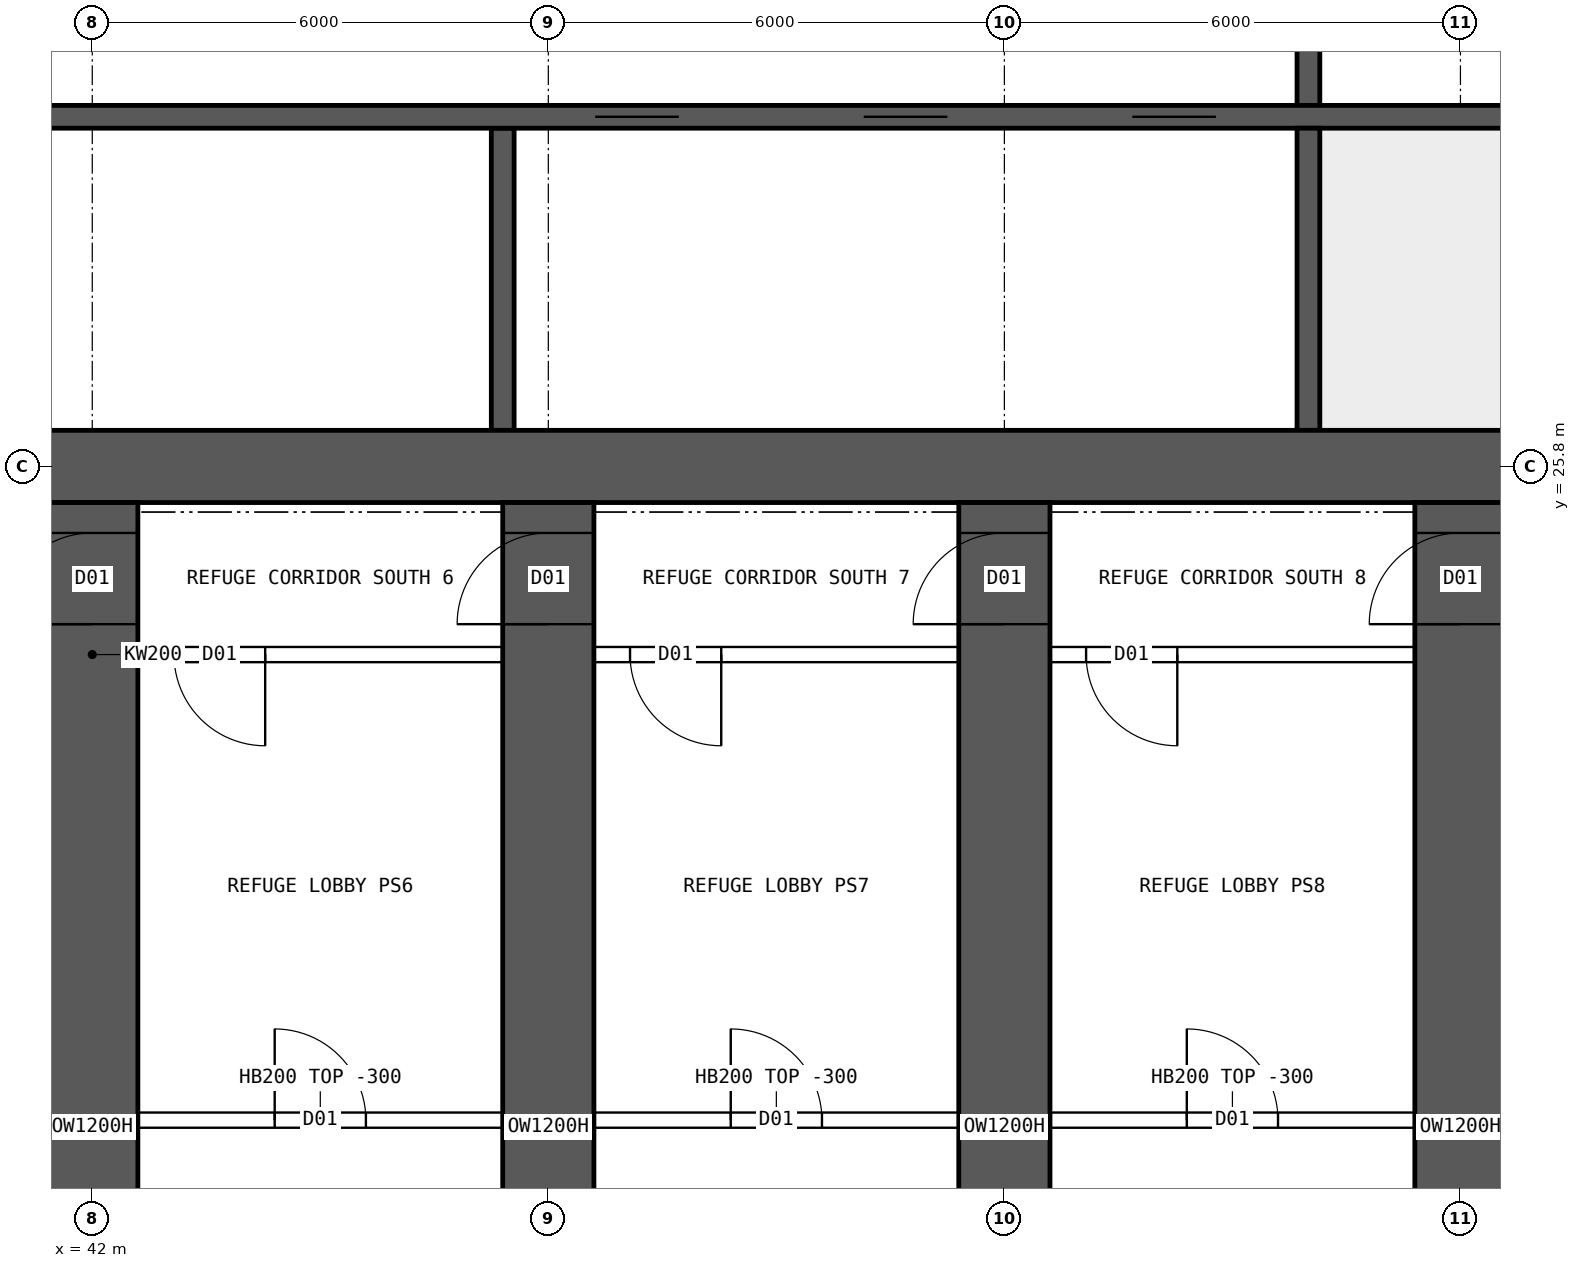
"""IFC4 building model, lengths in metres.
Left out: names, types, materials, properties, quantities, classifications, styles, units other than length and angle.
Written with IfcOpenShell. Run it as: python <this file> out.ifc"""

import sys

from ifc_helpers import new_model, si_unit, direction, frame, frame_2d, origin, place, context, subcontext, project, spatial, rectangle, extrude, element, fill, save


model = new_model("IFC4")
c1 = context("Model", 3, precision=1e-05, world=origin(), true_north=direction((0.0, 1.0)))
c2 = subcontext(c1, "Body", "Model", "MODEL_VIEW")
j1 = project(units=[si_unit("LENGTHUNIT", "METRE"), si_unit("PLANEANGLEUNIT", "RADIAN")], contexts=[c1])
p1 = place(None, origin())
s1 = spatial("IfcSite", under=j1, at=p1, CompositionType="ELEMENT")
p2 = place(p1, origin())
s2 = spatial("IfcBuilding", under=s1, at=p2, CompositionType="ELEMENT")
p3 = place(p2, frame((0.0, 0.0, 133.15)))
s3 = spatial("IfcBuildingStorey", under=s2, at=p3, CompositionType="ELEMENT", Elevation=133.15)
p4 = place(p3, frame((18.0, 25.8, 0.0), z_axis=(0.0, 0.0, 1.0), x_axis=(1.0, 0.0, 0.0)))
e1 = element("IfcWall", 1, at=p4, inside=s3, PredefinedType="SHEAR", context=c2, shape_type="SweptSolid", body=[
    extrude(rectangle(XDim=48.0, YDim=0.95, at=frame_2d((24.0, 0.0))), origin(), (0.0, 0.0, 1.0), 7.2),
])
p5 = place(p3, frame((18.475, 30.4, 0.0), z_axis=(0.0, 0.0, 1.0), x_axis=(1.0, 0.0, 0.0)))
e2 = element("IfcWall", 2, at=p5, inside=s3, PredefinedType="SHEAR", context=c2, shape_type="SweptSolid", body=[
    extrude(rectangle(XDim=47.05, YDim=0.3, at=frame_2d((23.525, 0.0))), origin(), (0.0, 0.0, 1.0), 7.2),
])
p6 = place(p5, frame((0.4, 0.0, 0.0)))
e3 = element("IfcOpeningElement", 3, at=p6, cuts=e2, PredefinedType="OPENING", context=c2, shape_type="SweptSolid", body=[
    extrude(rectangle(XDim=1.0, YDim=2.1, at=frame_2d((0.5, 1.05))), frame((0.0, 0.16, 0.0), z_axis=(0.0, -1.0, 0.0), x_axis=(1.0, 0.0, 0.0)), (0.0, 0.0, 1.0), 0.32),
])
p7 = place(p5, frame((45.65, 0.0, 0.0)))
e4 = element("IfcOpeningElement", 4, at=p7, cuts=e2, PredefinedType="OPENING", context=c2, shape_type="SweptSolid", body=[
    extrude(rectangle(XDim=1.0, YDim=2.1, at=frame_2d((0.5, 1.05))), frame((0.0, 0.16, 0.0), z_axis=(0.0, -1.0, 0.0), x_axis=(1.0, 0.0, 0.0)), (0.0, 0.0, 1.0), 0.32),
])
p8 = place(p5, frame((18.85, 0.0, 0.0)))
e5 = element("IfcOpeningElement", 5, at=p8, cuts=e2, PredefinedType="OPENING", context=c2, shape_type="SweptSolid", body=[
    extrude(rectangle(XDim=0.9, YDim=2.1, at=frame_2d((0.45, 1.05))), frame((0.0, 0.16, 0.0), z_axis=(0.0, -1.0, 0.0), x_axis=(1.0, 0.0, 0.0)), (0.0, 0.0, 1.0), 0.32),
])
p9 = place(p5, frame((30.142, 0.0, 0.0)))
e6 = element("IfcOpeningElement", 6, at=p9, cuts=e2, PredefinedType="OPENING", context=c2, shape_type="SweptSolid", body=[
    extrude(rectangle(XDim=1.1, YDim=2.1, at=frame_2d((0.55, 1.05))), frame((0.0, 0.16, 0.0), z_axis=(0.0, -1.0, 0.0), x_axis=(1.0, 0.0, 0.0)), (0.0, 0.0, 1.0), 0.32),
])
p10 = place(p5, frame((33.675, 0.0, 0.0)))
e7 = element("IfcOpeningElement", 7, at=p10, cuts=e2, PredefinedType="OPENING", context=c2, shape_type="SweptSolid", body=[
    extrude(rectangle(XDim=1.1, YDim=2.1, at=frame_2d((0.55, 1.05))), frame((0.0, 0.16, 0.0), z_axis=(0.0, -1.0, 0.0), x_axis=(1.0, 0.0, 0.0)), (0.0, 0.0, 1.0), 0.32),
])
p11 = place(p5, frame((37.208, 0.0, 0.0)))
e8 = element("IfcOpeningElement", 8, at=p11, cuts=e2, PredefinedType="OPENING", context=c2, shape_type="SweptSolid", body=[
    extrude(rectangle(XDim=1.1, YDim=2.1, at=frame_2d((0.55, 1.05))), frame((0.0, 0.16, 0.0), z_axis=(0.0, -1.0, 0.0), x_axis=(1.0, 0.0, 0.0)), (0.0, 0.0, 1.0), 0.32),
])
p12 = place(p3, frame((58.0, 26.275, 0.0), z_axis=(0.0, 0.0, 1.0), x_axis=(0.0, 1.0, 0.0)))
e9 = element("IfcWall", 9, at=p12, inside=s3, PredefinedType="SHEAR", context=c2, shape_type="SweptSolid", body=[
    extrude(rectangle(XDim=3.975, YDim=0.3, at=frame_2d((1.988, 0.0))), origin(), (0.0, 0.0, 1.0), 7.2),
])
p13 = place(p3, frame((58.0, 30.55, 0.0), z_axis=(0.0, 0.0, 1.0), x_axis=(0.0, 1.0, 0.0)))
e10 = element("IfcWall", 10, at=p13, inside=s3, PredefinedType="SHEAR", context=c2, shape_type="SweptSolid", body=[
    extrude(rectangle(XDim=3.9, YDim=0.3, at=frame_2d((1.95, 0.0))), origin(), (0.0, 0.0, 1.0), 7.2),
])
p14 = place(p13, frame((1.4, 0.0, 0.0)))
e11 = element("IfcOpeningElement", 11, at=p14, cuts=e10, PredefinedType="OPENING", context=c2, shape_type="SweptSolid", body=[
    extrude(rectangle(XDim=1.2, YDim=2.1, at=frame_2d((0.6, 1.05))), frame((0.0, 0.16, 0.0), z_axis=(0.0, -1.0, 0.0), x_axis=(1.0, 0.0, 0.0)), (0.0, 0.0, 1.0), 0.32),
])
p15 = place(p3, frame((47.4, 26.275, 0.0), z_axis=(0.0, 0.0, 1.0), x_axis=(0.0, 1.0, 0.0)))
e12 = element("IfcWall", 12, at=p15, inside=s3, PredefinedType="SHEAR", context=c2, shape_type="SweptSolid", body=[
    extrude(rectangle(XDim=3.975, YDim=0.3, at=frame_2d((1.988, 0.0))), origin(), (0.0, 0.0, 1.0), 7.2),
])
p16 = place(p3, frame((42.0, 8.9, 0.0), z_axis=(0.0, 0.0, 1.0), x_axis=(0.0, 1.0, 0.0)))
e13 = element("IfcWall", 13, at=p16, inside=s3, PredefinedType="SHEAR", context=c2, shape_type="SweptSolid", body=[
    extrude(rectangle(XDim=16.425, YDim=1.2, at=frame_2d((8.212, 0.0))), origin(), (0.0, 0.0, 1.0), 7.2),
])
p17 = place(p16, frame((14.825, 0.0, 0.0)))
e14 = element("IfcOpeningElement", 14, at=p17, cuts=e13, PredefinedType="OPENING", context=c2, shape_type="SweptSolid", body=[
    extrude(rectangle(XDim=1.2, YDim=2.1, at=frame_2d((0.6, 1.05))), frame((0.0, 0.61, 0.0), z_axis=(0.0, -1.0, 0.0), x_axis=(1.0, 0.0, 0.0)), (0.0, 0.0, 1.0), 1.22),
])
p18 = place(p3, frame((48.0, 8.9, 0.0), z_axis=(0.0, 0.0, 1.0), x_axis=(0.0, 1.0, 0.0)))
e15 = element("IfcWall", 15, at=p18, inside=s3, PredefinedType="SHEAR", context=c2, shape_type="SweptSolid", body=[
    extrude(rectangle(XDim=16.425, YDim=1.2, at=frame_2d((8.212, 0.0))), origin(), (0.0, 0.0, 1.0), 7.2),
])
p19 = place(p18, frame((14.825, 0.0, 0.0)))
e16 = element("IfcOpeningElement", 16, at=p19, cuts=e15, PredefinedType="OPENING", context=c2, shape_type="SweptSolid", body=[
    extrude(rectangle(XDim=1.2, YDim=2.1, at=frame_2d((0.6, 1.05))), frame((0.0, 0.61, 0.0), z_axis=(0.0, -1.0, 0.0), x_axis=(1.0, 0.0, 0.0)), (0.0, 0.0, 1.0), 1.22),
])
p20 = place(p3, frame((54.0, 8.9, 0.0), z_axis=(0.0, 0.0, 1.0), x_axis=(0.0, 1.0, 0.0)))
e17 = element("IfcWall", 17, at=p20, inside=s3, PredefinedType="SHEAR", context=c2, shape_type="SweptSolid", body=[
    extrude(rectangle(XDim=16.425, YDim=1.2, at=frame_2d((8.212, 0.0))), origin(), (0.0, 0.0, 1.0), 7.2),
])
p21 = place(p20, frame((14.825, 0.0, 0.0)))
e18 = element("IfcOpeningElement", 18, at=p21, cuts=e17, PredefinedType="OPENING", context=c2, shape_type="SweptSolid", body=[
    extrude(rectangle(XDim=1.2, YDim=2.1, at=frame_2d((0.6, 1.05))), frame((0.0, 0.61, 0.0), z_axis=(0.0, -1.0, 0.0), x_axis=(1.0, 0.0, 0.0)), (0.0, 0.0, 1.0), 1.22),
])
p22 = place(p3, frame((60.0, 8.9, 0.0), z_axis=(0.0, 0.0, 1.0), x_axis=(0.0, 1.0, 0.0)))
e19 = element("IfcWall", 19, at=p22, inside=s3, PredefinedType="SHEAR", context=c2, shape_type="SweptSolid", body=[
    extrude(rectangle(XDim=16.425, YDim=1.2, at=frame_2d((8.212, 0.0))), origin(), (0.0, 0.0, 1.0), 7.2),
])
p23 = place(p22, frame((14.825, 0.0, 0.0)))
e20 = element("IfcOpeningElement", 20, at=p23, cuts=e19, PredefinedType="OPENING", context=c2, shape_type="SweptSolid", body=[
    extrude(rectangle(XDim=1.2, YDim=2.1, at=frame_2d((0.6, 1.05))), frame((0.0, 0.61, 0.0), z_axis=(0.0, -1.0, 0.0), x_axis=(1.0, 0.0, 0.0)), (0.0, 0.0, 1.0), 1.22),
])
p24 = place(p3, frame((68.4, 23.325, 0.0), z_axis=(0.0, 0.0, 1.0), x_axis=(-1.0, 0.0, 0.0)))
e21 = element("IfcWall", 21, at=p24, inside=s3, PredefinedType="SOLIDWALL", context=c2, shape_type="SweptSolid", body=[
    extrude(rectangle(XDim=52.8, YDim=0.2, at=frame_2d((26.4, 0.0))), origin(), (0.0, 0.0, 1.0), 6.9),
])
p25 = place(p24, frame((51.0, 0.0, 0.0)))
e22 = element("IfcOpeningElement", 22, at=p25, cuts=e21, PredefinedType="OPENING", context=c2, shape_type="SweptSolid", body=[
    extrude(rectangle(XDim=1.2, YDim=2.1, at=frame_2d((0.6, 1.05))), frame((0.0, 0.11, 0.0), z_axis=(0.0, -1.0, 0.0), x_axis=(1.0, 0.0, 0.0)), (0.0, 0.0, 1.0), 0.22),
])
p26 = place(p24, frame((48.125, 0.0, 0.0)))
e23 = element("IfcOpeningElement", 23, at=p26, cuts=e21, PredefinedType="OPENING", context=c2, shape_type="SweptSolid", body=[
    extrude(rectangle(XDim=1.2, YDim=2.1, at=frame_2d((0.6, 1.05))), frame((0.0, 0.11, 0.0), z_axis=(0.0, -1.0, 0.0), x_axis=(1.0, 0.0, 0.0)), (0.0, 0.0, 1.0), 0.22),
])
p27 = place(p24, frame((42.125, 0.0, 0.0)))
e24 = element("IfcOpeningElement", 24, at=p27, cuts=e21, PredefinedType="OPENING", context=c2, shape_type="SweptSolid", body=[
    extrude(rectangle(XDim=1.2, YDim=2.1, at=frame_2d((0.6, 1.05))), frame((0.0, 0.11, 0.0), z_axis=(0.0, -1.0, 0.0), x_axis=(1.0, 0.0, 0.0)), (0.0, 0.0, 1.0), 0.22),
])
p28 = place(p24, frame((36.125, 0.0, 0.0)))
e25 = element("IfcOpeningElement", 25, at=p28, cuts=e21, PredefinedType="OPENING", context=c2, shape_type="SweptSolid", body=[
    extrude(rectangle(XDim=1.2, YDim=2.1, at=frame_2d((0.6, 1.05))), frame((0.0, 0.11, 0.0), z_axis=(0.0, -1.0, 0.0), x_axis=(1.0, 0.0, 0.0)), (0.0, 0.0, 1.0), 0.22),
])
p29 = place(p24, frame((30.125, 0.0, 0.0)))
e26 = element("IfcOpeningElement", 26, at=p29, cuts=e21, PredefinedType="OPENING", context=c2, shape_type="SweptSolid", body=[
    extrude(rectangle(XDim=1.2, YDim=2.1, at=frame_2d((0.6, 1.05))), frame((0.0, 0.11, 0.0), z_axis=(0.0, -1.0, 0.0), x_axis=(1.0, 0.0, 0.0)), (0.0, 0.0, 1.0), 0.22),
])
p30 = place(p24, frame((24.125, 0.0, 0.0)))
e27 = element("IfcOpeningElement", 27, at=p30, cuts=e21, PredefinedType="OPENING", context=c2, shape_type="SweptSolid", body=[
    extrude(rectangle(XDim=1.2, YDim=2.1, at=frame_2d((0.6, 1.05))), frame((0.0, 0.11, 0.0), z_axis=(0.0, -1.0, 0.0), x_axis=(1.0, 0.0, 0.0)), (0.0, 0.0, 1.0), 0.22),
])
p31 = place(p24, frame((18.125, 0.0, 0.0)))
e28 = element("IfcOpeningElement", 28, at=p31, cuts=e21, PredefinedType="OPENING", context=c2, shape_type="SweptSolid", body=[
    extrude(rectangle(XDim=1.2, YDim=2.1, at=frame_2d((0.6, 1.05))), frame((0.0, 0.11, 0.0), z_axis=(0.0, -1.0, 0.0), x_axis=(1.0, 0.0, 0.0)), (0.0, 0.0, 1.0), 0.22),
])
p32 = place(p24, frame((12.125, 0.0, 0.0)))
e29 = element("IfcOpeningElement", 29, at=p32, cuts=e21, PredefinedType="OPENING", context=c2, shape_type="SweptSolid", body=[
    extrude(rectangle(XDim=1.2, YDim=2.1, at=frame_2d((0.6, 1.05))), frame((0.0, 0.11, 0.0), z_axis=(0.0, -1.0, 0.0), x_axis=(1.0, 0.0, 0.0)), (0.0, 0.0, 1.0), 0.22),
])
p33 = place(p24, frame((6.125, 0.0, 0.0)))
e30 = element("IfcOpeningElement", 30, at=p33, cuts=e21, PredefinedType="OPENING", context=c2, shape_type="SweptSolid", body=[
    extrude(rectangle(XDim=1.2, YDim=2.1, at=frame_2d((0.6, 1.05))), frame((0.0, 0.11, 0.0), z_axis=(0.0, -1.0, 0.0), x_axis=(1.0, 0.0, 0.0)), (0.0, 0.0, 1.0), 0.22),
])
p34 = place(p24, frame((0.125, 0.0, 0.0)))
e31 = element("IfcOpeningElement", 31, at=p34, cuts=e21, PredefinedType="OPENING", context=c2, shape_type="SweptSolid", body=[
    extrude(rectangle(XDim=1.2, YDim=2.1, at=frame_2d((0.6, 1.05))), frame((0.0, 0.11, 0.0), z_axis=(0.0, -1.0, 0.0), x_axis=(1.0, 0.0, 0.0)), (0.0, 0.0, 1.0), 0.22),
])
p35 = place(p3, frame((36.475, 17.2, 0.0), z_axis=(0.0, 0.0, 1.0), x_axis=(1.0, 0.0, 0.0)))
e32 = element("IfcWall", 32, at=p35, inside=s3, PredefinedType="SOLIDWALL", context=c2, shape_type="SweptSolid", body=[
    extrude(rectangle(XDim=5.05, YDim=0.2, at=frame_2d((2.525, 0.0))), origin(), (0.0, 0.0, 1.0), 6.9),
])
p36 = place(p35, frame((1.925, 0.0, 0.0)))
e33 = element("IfcOpeningElement", 33, at=p36, cuts=e32, PredefinedType="OPENING", context=c2, shape_type="SweptSolid", body=[
    extrude(rectangle(XDim=1.2, YDim=2.1, at=frame_2d((0.6, 1.05))), frame((0.0, 0.11, 0.0), z_axis=(0.0, -1.0, 0.0), x_axis=(1.0, 0.0, 0.0)), (0.0, 0.0, 1.0), 0.22),
])
p37 = place(p3, frame((42.475, 17.2, 0.0), z_axis=(0.0, 0.0, 1.0), x_axis=(1.0, 0.0, 0.0)))
e34 = element("IfcWall", 34, at=p37, inside=s3, PredefinedType="SOLIDWALL", context=c2, shape_type="SweptSolid", body=[
    extrude(rectangle(XDim=5.05, YDim=0.2, at=frame_2d((2.525, 0.0))), origin(), (0.0, 0.0, 1.0), 6.9),
])
p38 = place(p37, frame((1.925, 0.0, 0.0)))
e35 = element("IfcOpeningElement", 35, at=p38, cuts=e34, PredefinedType="OPENING", context=c2, shape_type="SweptSolid", body=[
    extrude(rectangle(XDim=1.2, YDim=2.1, at=frame_2d((0.6, 1.05))), frame((0.0, 0.11, 0.0), z_axis=(0.0, -1.0, 0.0), x_axis=(1.0, 0.0, 0.0)), (0.0, 0.0, 1.0), 0.22),
])
p39 = place(p3, frame((48.475, 17.2, 0.0), z_axis=(0.0, 0.0, 1.0), x_axis=(1.0, 0.0, 0.0)))
e36 = element("IfcWall", 36, at=p39, inside=s3, PredefinedType="SOLIDWALL", context=c2, shape_type="SweptSolid", body=[
    extrude(rectangle(XDim=5.05, YDim=0.2, at=frame_2d((2.525, 0.0))), origin(), (0.0, 0.0, 1.0), 6.9),
])
p40 = place(p39, frame((1.925, 0.0, 0.0)))
e37 = element("IfcOpeningElement", 37, at=p40, cuts=e36, PredefinedType="OPENING", context=c2, shape_type="SweptSolid", body=[
    extrude(rectangle(XDim=1.2, YDim=2.1, at=frame_2d((0.6, 1.05))), frame((0.0, 0.11, 0.0), z_axis=(0.0, -1.0, 0.0), x_axis=(1.0, 0.0, 0.0)), (0.0, 0.0, 1.0), 0.22),
])
p41 = place(p3, frame((54.475, 17.2, 0.0), z_axis=(0.0, 0.0, 1.0), x_axis=(1.0, 0.0, 0.0)))
e38 = element("IfcWall", 38, at=p41, inside=s3, PredefinedType="SOLIDWALL", context=c2, shape_type="SweptSolid", body=[
    extrude(rectangle(XDim=5.05, YDim=0.2, at=frame_2d((2.525, 0.0))), origin(), (0.0, 0.0, 1.0), 6.9),
])
p42 = place(p41, frame((1.925, 0.0, 0.0)))
e39 = element("IfcOpeningElement", 39, at=p42, cuts=e38, PredefinedType="OPENING", context=c2, shape_type="SweptSolid", body=[
    extrude(rectangle(XDim=1.2, YDim=2.1, at=frame_2d((0.6, 1.05))), frame((0.0, 0.11, 0.0), z_axis=(0.0, -1.0, 0.0), x_axis=(1.0, 0.0, 0.0)), (0.0, 0.0, 1.0), 0.22),
])
p43 = place(p3, frame((60.475, 17.2, 0.0), z_axis=(0.0, 0.0, 1.0), x_axis=(1.0, 0.0, 0.0)))
e40 = element("IfcWall", 40, at=p43, inside=s3, PredefinedType="SOLIDWALL", context=c2, shape_type="SweptSolid", body=[
    extrude(rectangle(XDim=5.05, YDim=0.2, at=frame_2d((2.525, 0.0))), origin(), (0.0, 0.0, 1.0), 6.9),
])
p44 = place(p43, frame((1.925, 0.0, 0.0)))
e41 = element("IfcOpeningElement", 41, at=p44, cuts=e40, PredefinedType="OPENING", context=c2, shape_type="SweptSolid", body=[
    extrude(rectangle(XDim=1.2, YDim=2.1, at=frame_2d((0.6, 1.05))), frame((0.0, 0.11, 0.0), z_axis=(0.0, -1.0, 0.0), x_axis=(1.0, 0.0, 0.0)), (0.0, 0.0, 1.0), 0.22),
])
p45 = place(p9, origin())
e42 = element("IfcDoor", 42, at=p45, inside=s3, OperationType="DOUBLE_DOOR_SLIDING", PredefinedType="DOOR", context=c2, shape_type="SweptSolid", body=[
    extrude(rectangle(XDim=1.1, YDim=2.1, at=frame_2d((0.55, 1.05))), frame((0.0, 0.025, 0.0), z_axis=(0.0, -1.0, 0.0), x_axis=(1.0, 0.0, 0.0)), (0.0, 0.0, 1.0), 0.05),
])
fill(e6, e42)
p46 = place(p10, origin())
e43 = element("IfcDoor", 43, at=p46, inside=s3, OperationType="DOUBLE_DOOR_SLIDING", PredefinedType="DOOR", context=c2, shape_type="SweptSolid", body=[
    extrude(rectangle(XDim=1.1, YDim=2.1, at=frame_2d((0.55, 1.05))), frame((0.0, 0.025, 0.0), z_axis=(0.0, -1.0, 0.0), x_axis=(1.0, 0.0, 0.0)), (0.0, 0.0, 1.0), 0.05),
])
fill(e7, e43)
p47 = place(p11, origin())
e44 = element("IfcDoor", 44, at=p47, inside=s3, OperationType="DOUBLE_DOOR_SLIDING", PredefinedType="DOOR", context=c2, shape_type="SweptSolid", body=[
    extrude(rectangle(XDim=1.1, YDim=2.1, at=frame_2d((0.55, 1.05))), frame((0.0, 0.025, 0.0), z_axis=(0.0, -1.0, 0.0), x_axis=(1.0, 0.0, 0.0)), (0.0, 0.0, 1.0), 0.05),
])
fill(e8, e44)
p48 = place(p38, origin())
e45 = element("IfcDoor", 45, at=p48, inside=s3, OperationType="SINGLE_SWING_LEFT", PredefinedType="DOOR", context=c2, shape_type="SweptSolid", body=[
    extrude(rectangle(XDim=1.2, YDim=2.1, at=frame_2d((0.6, 1.05))), frame((0.0, 0.025, 0.0), z_axis=(0.0, -1.0, 0.0), x_axis=(1.0, 0.0, 0.0)), (0.0, 0.0, 1.0), 0.05),
])
fill(e35, e45)
p49 = place(p40, origin())
e46 = element("IfcDoor", 46, at=p49, inside=s3, OperationType="SINGLE_SWING_LEFT", PredefinedType="DOOR", context=c2, shape_type="SweptSolid", body=[
    extrude(rectangle(XDim=1.2, YDim=2.1, at=frame_2d((0.6, 1.05))), frame((0.0, 0.025, 0.0), z_axis=(0.0, -1.0, 0.0), x_axis=(1.0, 0.0, 0.0)), (0.0, 0.0, 1.0), 0.05),
])
fill(e37, e46)
p50 = place(p42, origin())
e47 = element("IfcDoor", 47, at=p50, inside=s3, OperationType="SINGLE_SWING_LEFT", PredefinedType="DOOR", context=c2, shape_type="SweptSolid", body=[
    extrude(rectangle(XDim=1.2, YDim=2.1, at=frame_2d((0.6, 1.05))), frame((0.0, 0.025, 0.0), z_axis=(0.0, -1.0, 0.0), x_axis=(1.0, 0.0, 0.0)), (0.0, 0.0, 1.0), 0.05),
])
fill(e39, e47)
p51 = place(p30, origin())
e48 = element("IfcDoor", 48, at=p51, inside=s3, OperationType="SINGLE_SWING_LEFT", PredefinedType="DOOR", context=c2, shape_type="SweptSolid", body=[
    extrude(rectangle(XDim=1.2, YDim=2.1, at=frame_2d((0.6, 1.05))), frame((0.0, 0.025, 0.0), z_axis=(0.0, -1.0, 0.0), x_axis=(1.0, 0.0, 0.0)), (0.0, 0.0, 1.0), 0.05),
])
fill(e27, e48)
p52 = place(p31, origin())
e49 = element("IfcDoor", 49, at=p52, inside=s3, OperationType="SINGLE_SWING_LEFT", PredefinedType="DOOR", context=c2, shape_type="SweptSolid", body=[
    extrude(rectangle(XDim=1.2, YDim=2.1, at=frame_2d((0.6, 1.05))), frame((0.0, 0.025, 0.0), z_axis=(0.0, -1.0, 0.0), x_axis=(1.0, 0.0, 0.0)), (0.0, 0.0, 1.0), 0.05),
])
fill(e28, e49)
p53 = place(p32, origin())
e50 = element("IfcDoor", 50, at=p53, inside=s3, OperationType="SINGLE_SWING_LEFT", PredefinedType="DOOR", context=c2, shape_type="SweptSolid", body=[
    extrude(rectangle(XDim=1.2, YDim=2.1, at=frame_2d((0.6, 1.05))), frame((0.0, 0.025, 0.0), z_axis=(0.0, -1.0, 0.0), x_axis=(1.0, 0.0, 0.0)), (0.0, 0.0, 1.0), 0.05),
])
fill(e29, e50)
p54 = place(p17, origin())
e51 = element("IfcDoor", 51, at=p54, inside=s3, OperationType="SINGLE_SWING_LEFT", PredefinedType="DOOR", context=c2, shape_type="SweptSolid", body=[
    extrude(rectangle(XDim=1.2, YDim=2.1, at=frame_2d((0.6, 1.05))), frame((0.0, 0.025, 0.0), z_axis=(0.0, -1.0, 0.0), x_axis=(1.0, 0.0, 0.0)), (0.0, 0.0, 1.0), 0.05),
])
fill(e14, e51)
p55 = place(p19, origin())
e52 = element("IfcDoor", 52, at=p55, inside=s3, OperationType="SINGLE_SWING_LEFT", PredefinedType="DOOR", context=c2, shape_type="SweptSolid", body=[
    extrude(rectangle(XDim=1.2, YDim=2.1, at=frame_2d((0.6, 1.05))), frame((0.0, 0.025, 0.0), z_axis=(0.0, -1.0, 0.0), x_axis=(1.0, 0.0, 0.0)), (0.0, 0.0, 1.0), 0.05),
])
fill(e16, e52)
p56 = place(p21, origin())
e53 = element("IfcDoor", 53, at=p56, inside=s3, OperationType="SINGLE_SWING_LEFT", PredefinedType="DOOR", context=c2, shape_type="SweptSolid", body=[
    extrude(rectangle(XDim=1.2, YDim=2.1, at=frame_2d((0.6, 1.05))), frame((0.0, 0.025, 0.0), z_axis=(0.0, -1.0, 0.0), x_axis=(1.0, 0.0, 0.0)), (0.0, 0.0, 1.0), 0.05),
])
fill(e18, e53)
p57 = place(p23, origin())
e54 = element("IfcDoor", 54, at=p57, inside=s3, OperationType="SINGLE_SWING_LEFT", PredefinedType="DOOR", context=c2, shape_type="SweptSolid", body=[
    extrude(rectangle(XDim=1.2, YDim=2.1, at=frame_2d((0.6, 1.05))), frame((0.0, 0.025, 0.0), z_axis=(0.0, -1.0, 0.0), x_axis=(1.0, 0.0, 0.0)), (0.0, 0.0, 1.0), 0.05),
])
fill(e20, e54)
save(model, sys.argv[1])
